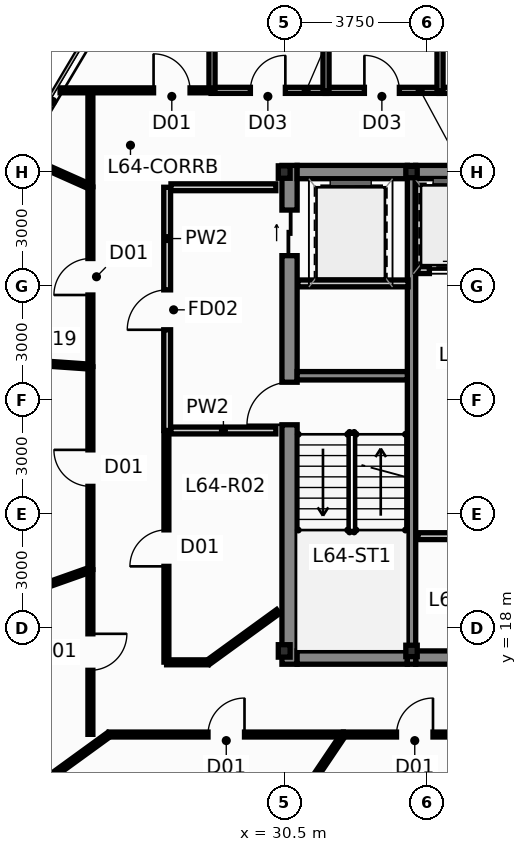
"""IFC4 building model, lengths in metres.
Left out: names, types, materials, properties, quantities, classifications, styles, units other than length and angle.
Written with IfcOpenShell. Run it as: python <this file> out.ifc"""

import sys

from ifc_helpers import new_model, si_unit, direction, frame, frame_2d, origin, origin_2d, place, context, subcontext, project, spatial, rectangle, hollow_rectangle, i_section, extrude, source, transform, mapped, element, fill, save


model = new_model("IFC4")
c1 = context("Model", 3, precision=1e-05, world=origin(), true_north=direction((0.0, 1.0)))
c2 = subcontext(c1, "Body", "Model", "MODEL_VIEW")
j1 = project(units=[si_unit("LENGTHUNIT", "METRE"), si_unit("PLANEANGLEUNIT", "RADIAN")], contexts=[c1])
p1 = place(None, origin())
s1 = spatial("IfcSite", under=j1, at=p1, CompositionType="ELEMENT")
p2 = place(p1, origin())
s2 = spatial("IfcBuilding", under=s1, at=p2, CompositionType="ELEMENT")
p3 = place(p2, frame((0.0, 0.0, 244.45)))
s3 = spatial("IfcBuildingStorey", under=s2, at=p3, CompositionType="ELEMENT", Elevation=244.45)
m1 = source(origin(), c2, "Body", "SweptSolid", [
    extrude(i_section(OverallWidth=0.311, OverallDepth=0.327, WebThickness=0.016, FlangeThickness=0.025, at=origin_2d()), origin(), (0.0, 0.0, 1.0), 3.65),
])
for number, where, z_axis, x_axis in (
    (1, (30.5, 17.4, 0.0), (0.0, 0.0, 1.0), (1.0, 0.0, 0.0)),
    (2, (30.5, 30.0, 0.0), (0.0, 0.0, 1.0), (1.0, 0.0, 0.0)),
):
    element("IfcColumn", number, at=place(p3, frame(where, z_axis=z_axis, x_axis=x_axis)), inside=s3, PredefinedType="COLUMN", context=c2, shape_type="MappedRepresentation", body=[
        mapped(m1, transform((0.0, 0.0, 0.0), scale=1.0)),
    ])
m2 = source(origin(), c2, "Body", "SweptSolid", [
    extrude(hollow_rectangle(XDim=0.3, YDim=0.3, WallThickness=0.012, at=origin_2d()), origin(), (0.0, 0.0, 1.0), 3.65),
])
for number, where, z_axis, x_axis in (
    (3, (33.85, 17.4, 0.0), (0.0, 0.0, 1.0), (1.0, 0.0, 0.0)),
    (4, (33.85, 30.0, 0.0), (0.0, 0.0, 1.0), (1.0, 0.0, 0.0)),
):
    element("IfcColumn", number, at=place(p3, frame(where, z_axis=z_axis, x_axis=x_axis)), inside=s3, PredefinedType="COLUMN", context=c2, shape_type="MappedRepresentation", body=[
        mapped(m2, transform((0.0, 0.0, 0.0), scale=1.0)),
    ])
p4 = place(p3, frame((30.64, 17.05, 0.0), z_axis=(0.0, 0.0, 1.0), x_axis=(0.0, 1.0, 0.0)))
e5 = element("IfcWall", 5, at=p4, inside=s3, PredefinedType="SHEAR", context=c2, shape_type="SweptSolid", body=[
    extrude(rectangle(XDim=13.125, YDim=0.4, at=frame_2d((6.562, 0.0))), origin(), (0.0, 0.0, 1.0), 3.65),
])
p5 = place(p4, frame((6.3, 0.0, 0.0)))
e6 = element("IfcOpeningElement", 6, at=p5, cuts=e5, PredefinedType="OPENING", context=c2, shape_type="SweptSolid", body=[
    extrude(rectangle(XDim=1.12, YDim=2.15, at=frame_2d((0.56, 1.075))), frame((0.0, 0.212, 0.0), z_axis=(0.0, -1.0, 0.0), x_axis=(1.0, 0.0, 0.0)), (0.0, 0.0, 1.0), 0.424),
])
p6 = place(p4, frame((10.75, 0.0, 0.0)))
e7 = element("IfcOpeningElement", 7, at=p6, cuts=e5, PredefinedType="OPENING", context=c2, shape_type="SweptSolid", body=[
    extrude(rectangle(XDim=1.2, YDim=2.2, at=frame_2d((0.6, 1.1))), frame((0.0, 0.212, 0.0), z_axis=(0.0, -1.0, 0.0), x_axis=(1.0, 0.0, 0.0)), (0.0, 0.0, 1.0), 0.424),
])
p7 = place(p3, frame((30.84, 17.225, 0.0), z_axis=(0.0, 0.0, 1.0), x_axis=(1.0, 0.0, 0.0)))
e8 = element("IfcWall", 8, at=p7, inside=s3, PredefinedType="SHEAR", context=c2, shape_type="SweptSolid", body=[
    extrude(rectangle(XDim=2.9, YDim=0.35, at=frame_2d((1.45, 0.0))), origin(), (0.0, 0.0, 1.0), 3.65),
])
p8 = place(p3, frame((33.96, 17.225, 0.0), z_axis=(0.0, 0.0, 1.0), x_axis=(1.0, 0.0, 0.0)))
e9 = element("IfcWall", 9, at=p8, inside=s3, PredefinedType="SHEAR", context=c2, shape_type="SweptSolid", body=[
    extrude(rectangle(XDim=8.08, YDim=0.35, at=frame_2d((4.04, 0.0))), origin(), (0.0, 0.0, 1.0), 3.65),
])
p9 = place(p3, frame((30.84, 30.0, 0.0), z_axis=(0.0, 0.0, 1.0), x_axis=(1.0, 0.0, 0.0)))
e10 = element("IfcWall", 10, at=p9, inside=s3, PredefinedType="SHEAR", context=c2, shape_type="SweptSolid", body=[
    extrude(rectangle(XDim=2.9, YDim=0.35, at=frame_2d((1.45, 0.0))), origin(), (0.0, 0.0, 1.0), 3.65),
])
p10 = place(p3, frame((33.96, 30.0, 0.0), z_axis=(0.0, 0.0, 1.0), x_axis=(1.0, 0.0, 0.0)))
e11 = element("IfcWall", 11, at=p10, inside=s3, PredefinedType="SHEAR", context=c2, shape_type="SweptSolid", body=[
    extrude(rectangle(XDim=3.78, YDim=0.35, at=frame_2d((1.89, 0.0))), origin(), (0.0, 0.0, 1.0), 3.65),
])
p11 = place(p3, frame((33.85, 17.05, 0.0), z_axis=(0.0, 0.0, 1.0), x_axis=(0.0, 1.0, 0.0)))
e12 = element("IfcWall", 12, at=p11, inside=s3, PredefinedType="SHEAR", context=c2, shape_type="SweptSolid", body=[
    extrude(rectangle(XDim=13.125, YDim=0.22, at=frame_2d((6.562, 0.0))), origin(), (0.0, 0.0, 1.0), 3.65),
])
p12 = place(p3, frame((30.84, 24.64, 0.0), z_axis=(0.0, 0.0, 1.0), x_axis=(1.0, 0.0, 0.0)))
e13 = element("IfcWall", 13, at=p12, inside=s3, PredefinedType="SHEAR", context=c2, shape_type="SweptSolid", body=[
    extrude(rectangle(XDim=2.9, YDim=0.22, at=frame_2d((1.45, 0.0))), origin(), (0.0, 0.0, 1.0), 3.65),
])
p13 = place(p3, frame((34.02, 27.42, 0.0), z_axis=(0.0, 0.0, 1.0), x_axis=(1.0, 0.0, 0.0)))
e14 = element("IfcWall", 14, at=p13, inside=s3, PredefinedType="PARTITIONING", context=c2, shape_type="SweptSolid", body=[
    extrude(rectangle(XDim=3.66, YDim=0.18, at=frame_2d((1.83, 0.0))), origin(), (0.0, 0.0, 1.0), 3.4),
])
p14 = place(p13, frame((0.3, 0.0, 0.0)))
e15 = element("IfcOpeningElement", 15, at=p14, cuts=e14, PredefinedType="OPENING", context=c2, shape_type="SweptSolid", body=[
    extrude(rectangle(XDim=1.15, YDim=2.2, at=frame_2d((0.575, 1.1))), frame((0.0, 0.102, 0.0), z_axis=(0.0, -1.0, 0.0), x_axis=(1.0, 0.0, 0.0)), (0.0, 0.0, 1.0), 0.204),
])
p15 = place(p13, frame((2.1, 0.0, 0.0)))
e16 = element("IfcOpeningElement", 16, at=p15, cuts=e14, PredefinedType="OPENING", context=c2, shape_type="SweptSolid", body=[
    extrude(rectangle(XDim=1.15, YDim=2.2, at=frame_2d((0.575, 1.1))), frame((0.0, 0.102, 0.0), z_axis=(0.0, -1.0, 0.0), x_axis=(1.0, 0.0, 0.0)), (0.0, 0.0, 1.0), 0.204),
])
p16 = place(p3, frame((27.42, 23.2, 0.0), z_axis=(0.0, 0.0, 1.0), x_axis=(0.0, 1.0, 0.0)))
e17 = element("IfcWall", 17, at=p16, inside=s3, PredefinedType="PARTITIONING", context=c2, shape_type="SweptSolid", body=[
    extrude(rectangle(XDim=6.4, YDim=0.18, at=frame_2d((3.2, 0.0))), origin(), (0.0, 0.0, 1.0), 3.129),
])
p17 = place(p16, frame((2.65, 0.0, 0.0)))
e18 = element("IfcOpeningElement", 18, at=p17, cuts=e17, PredefinedType="OPENING", context=c2, shape_type="SweptSolid", body=[
    extrude(rectangle(XDim=1.05, YDim=2.15, at=frame_2d((0.525, 1.075))), frame((0.0, 0.102, 0.0), z_axis=(0.0, -1.0, 0.0), x_axis=(1.0, 0.0, 0.0)), (0.0, 0.0, 1.0), 0.204),
])
for number, where, z_axis, x_axis in (
    (19, (27.52, 23.2, 0.0), (0.0, 0.0, 1.0), (1.0, 0.0, 0.0)),
    (20, (27.52, 29.6, 0.0), (0.0, 0.0, 1.0), (1.0, 0.0, 0.0)),
):
    element("IfcWall", number, at=place(p3, frame(where, z_axis=z_axis, x_axis=x_axis)), inside=s3, PredefinedType="PARTITIONING", context=c2, shape_type="SweptSolid", body=[
        extrude(rectangle(XDim=2.76, YDim=0.18, at=frame_2d((1.38, 0.0))), origin(), (0.0, 0.0, 1.0), 3.4),
    ])
p18 = place(p3, frame((30.86, 27.07, 0.0), z_axis=(0.0, 0.0, 1.0), x_axis=(1.0, 0.0, 0.0)))
e21 = element("IfcWall", 21, at=p18, inside=s3, PredefinedType="PARTITIONING", context=c2, shape_type="SweptSolid", body=[
    extrude(rectangle(XDim=2.9, YDim=0.18, at=frame_2d((1.45, 0.0))), origin(), (0.0, 0.0, 1.0), 3.4),
])
p19 = place(p3, frame((34.02, 20.42, 0.0), z_axis=(0.0, 0.0, 1.0), x_axis=(1.0, 0.0, 0.0)))
e22 = element("IfcWall", 22, at=p19, inside=s3, PredefinedType="PARTITIONING", context=c2, shape_type="SweptSolid", body=[
    extrude(rectangle(XDim=3.64, YDim=0.18, at=frame_2d((1.82, 0.0))), origin(), (0.0, 0.0, 1.0), 3.4),
])
p20 = place(p3, frame((28.575, 32.15, 0.0), z_axis=(0.0, 0.0, 1.0), x_axis=(1.0, 0.0, 0.0)))
e23 = element("IfcWall", 23, at=p20, inside=s3, PredefinedType="PLUMBINGWALL", context=c2, shape_type="SweptSolid", body=[
    extrude(rectangle(XDim=3.05, YDim=0.16, at=frame_2d((1.525, 0.0))), origin(), (0.0, 0.0, 1.0), 3.4),
])
p21 = place(p20, frame((1.035, 0.0, 0.0)))
e24 = element("IfcOpeningElement", 24, at=p21, cuts=e23, PredefinedType="OPENING", context=c2, shape_type="SweptSolid", body=[
    extrude(rectangle(XDim=0.92, YDim=2.1, at=frame_2d((0.46, 1.05))), frame((0.0, 0.092, 0.0), z_axis=(0.0, -1.0, 0.0), x_axis=(1.0, 0.0, 0.0)), (0.0, 0.0, 1.0), 0.184),
])
p22 = place(p3, frame((31.575, 32.15, 0.0), z_axis=(0.0, 0.0, 1.0), x_axis=(1.0, 0.0, 0.0)))
e25 = element("IfcWall", 25, at=p22, inside=s3, PredefinedType="PLUMBINGWALL", context=c2, shape_type="SweptSolid", body=[
    extrude(rectangle(XDim=3.05, YDim=0.16, at=frame_2d((1.525, 0.0))), origin(), (0.0, 0.0, 1.0), 3.4),
])
p23 = place(p22, frame((1.035, 0.0, 0.0)))
e26 = element("IfcOpeningElement", 26, at=p23, cuts=e25, PredefinedType="OPENING", context=c2, shape_type="SweptSolid", body=[
    extrude(rectangle(XDim=0.92, YDim=2.1, at=frame_2d((0.46, 1.05))), frame((0.0, 0.092, 0.0), z_axis=(0.0, -1.0, 0.0), x_axis=(1.0, 0.0, 0.0)), (0.0, 0.0, 1.0), 0.184),
])
p24 = place(p3, frame((34.575, 32.15, 0.0), z_axis=(0.0, 0.0, 1.0), x_axis=(1.0, 0.0, 0.0)))
e27 = element("IfcWall", 27, at=p24, inside=s3, PredefinedType="PLUMBINGWALL", context=c2, shape_type="SweptSolid", body=[
    extrude(rectangle(XDim=3.05, YDim=0.16, at=frame_2d((1.525, 0.0))), origin(), (0.0, 0.0, 1.0), 3.4),
])
p25 = place(p24, frame((1.035, 0.0, 0.0)))
e28 = element("IfcOpeningElement", 28, at=p25, cuts=e27, PredefinedType="OPENING", context=c2, shape_type="SweptSolid", body=[
    extrude(rectangle(XDim=0.92, YDim=2.1, at=frame_2d((0.46, 1.05))), frame((0.0, 0.092, 0.0), z_axis=(0.0, -1.0, 0.0), x_axis=(1.0, 0.0, 0.0)), (0.0, 0.0, 1.0), 0.184),
])
for number, where, z_axis, x_axis in (
    (29, (31.6, 32.125, 0.0), (0.0, 0.0, 1.0), (0.0, 1.0, 0.0)),
    (30, (28.6, 32.125, 0.0), (0.0, 0.0, 1.0), (0.0, 1.0, 0.0)),
):
    element("IfcWall", number, at=place(p3, frame(where, z_axis=z_axis, x_axis=x_axis)), inside=s3, PredefinedType="PLUMBINGWALL", context=c2, shape_type="SweptSolid", body=[
        extrude(rectangle(XDim=2.85, YDim=0.16, at=frame_2d((1.425, 0.0))), origin(), (0.0, 0.0, 1.0), 2.985),
    ])
p26 = place(p3, frame((34.6, 32.125, 0.0), z_axis=(0.0, 0.0, 1.0), x_axis=(0.0, 1.0, 0.0)))
e31 = element("IfcWall", 31, at=p26, inside=s3, PredefinedType="PLUMBINGWALL", context=c2, shape_type="SweptSolid", body=[
    extrude(rectangle(XDim=2.85, YDim=0.16, at=frame_2d((1.425, 0.0))), origin(), (0.0, 0.0, 1.0), 3.4),
])
p27 = place(p3, frame((15.82, 7.884, 0.0), z_axis=(0.0, 0.0, 1.0), x_axis=(0.809043133631, 0.587749273011, 0.0)))
e32 = element("IfcWall", 32, at=p27, inside=s3, PredefinedType="PARTITIONING", context=c2, shape_type="SweptSolid", body=[
    extrude(rectangle(XDim=12.442, YDim=0.13, at=frame_2d((6.221, 0.0))), origin(), (0.0, 0.0, 1.0), 3.4),
])
p28 = place(p3, frame((14.863, 15.811, 0.0), z_axis=(0.0, 0.0, 1.0), x_axis=(0.942701126823, 0.333638405293, 0.0)))
e33 = element("IfcWall", 33, at=p28, inside=s3, PredefinedType="PARTITIONING", context=c2, shape_type="SweptSolid", body=[
    extrude(rectangle(XDim=11.172, YDim=0.13, at=frame_2d((5.586, 0.0))), origin(), (0.0, 0.0, 1.0), 2.985),
])
p29 = place(p3, frame((27.062, 7.783, 0.0), z_axis=(0.0, 0.0, 1.0), x_axis=(0.558733820508, 0.829347043053, 0.0)))
e34 = element("IfcWall", 34, at=p29, inside=s3, PredefinedType="PARTITIONING", context=c2, shape_type="SweptSolid", body=[
    extrude(rectangle(XDim=8.939, YDim=0.13, at=frame_2d((4.469, 0.0))), origin(), (0.0, 0.0, 1.0), 3.4),
])
p30 = place(p3, frame((33.943, 7.721, 0.0), z_axis=(0.0, 0.0, 1.0), x_axis=(0.242274634851, 0.970207710394, 0.0)))
e35 = element("IfcWall", 35, at=p30, inside=s3, PredefinedType="PARTITIONING", context=c2, shape_type="SweptSolid", body=[
    extrude(rectangle(XDim=7.704, YDim=0.13, at=frame_2d((3.852, 0.0))), origin(), (0.0, 0.0, 1.0), 3.4),
])
p31 = place(p3, frame((25.895, 15.2, 0.0), z_axis=(0.0, 0.0, 1.0), x_axis=(1.0, 0.0, 0.0)))
e36 = element("IfcWall", 36, at=p31, inside=s3, PredefinedType="PARTITIONING", context=c2, shape_type="SweptSolid", body=[
    extrude(rectangle(XDim=6.16, YDim=0.13, at=frame_2d((3.08, 0.0))), origin(), (0.0, 0.0, 1.0), 3.129),
])
p32 = place(p31, frame((2.6, 0.0, 0.0)))
e37 = element("IfcOpeningElement", 37, at=p32, cuts=e36, PredefinedType="OPENING", context=c2, shape_type="SweptSolid", body=[
    extrude(rectangle(XDim=0.96, YDim=2.15, at=frame_2d((0.48, 1.075))), frame((0.0, 0.077, 0.0), z_axis=(0.0, -1.0, 0.0), x_axis=(1.0, 0.0, 0.0)), (0.0, 0.0, 1.0), 0.154),
])
p33 = place(p3, frame((27.4, 17.105, 0.0), z_axis=(0.0, 0.0, 1.0), x_axis=(0.0, 1.0, 0.0)))
e38 = element("IfcWall", 38, at=p33, inside=s3, PredefinedType="PARTITIONING", context=c2, shape_type="SweptSolid", body=[
    extrude(rectangle(XDim=6.0, YDim=0.13, at=frame_2d((3.0, 0.0))), origin(), (0.0, 0.0, 1.0), 3.4),
])
p34 = place(p33, frame((2.52, 0.0, 0.0)))
e39 = element("IfcOpeningElement", 39, at=p34, cuts=e38, PredefinedType="OPENING", context=c2, shape_type="SweptSolid", body=[
    extrude(rectangle(XDim=0.96, YDim=2.15, at=frame_2d((0.48, 1.075))), frame((0.0, 0.077, 0.0), z_axis=(0.0, -1.0, 0.0), x_axis=(1.0, 0.0, 0.0)), (0.0, 0.0, 1.0), 0.154),
])
p35 = place(p3, frame((25.4, 19.545, 0.0), z_axis=(0.0, 0.0, 1.0), x_axis=(0.0, 1.0, 0.0)))
e40 = element("IfcWall", 40, at=p35, inside=s3, PredefinedType="PARTITIONING", context=c2, shape_type="SweptSolid", body=[
    extrude(rectangle(XDim=5.33, YDim=0.13, at=frame_2d((2.665, 0.0))), origin(), (0.0, 0.0, 1.0), 3.129),
])
p36 = place(p35, frame((2.185, 0.0, 0.0)))
e41 = element("IfcOpeningElement", 41, at=p36, cuts=e40, PredefinedType="OPENING", context=c2, shape_type="SweptSolid", body=[
    extrude(rectangle(XDim=0.96, YDim=2.15, at=frame_2d((0.48, 1.075))), frame((0.0, 0.077, 0.0), z_axis=(0.0, -1.0, 0.0), x_axis=(1.0, 0.0, 0.0)), (0.0, 0.0, 1.0), 0.154),
])
p37 = place(p3, frame((20.458, 25.222, 0.0), z_axis=(0.0, 0.0, 1.0), x_axis=(0.997601870104, -0.069213501323, 0.0)))
e42 = element("IfcWall", 42, at=p37, inside=s3, PredefinedType="PARTITIONING", context=c2, shape_type="SweptSolid", body=[
    extrude(rectangle(XDim=4.949, YDim=0.13, at=frame_2d((2.475, 0.0))), origin(), (0.0, 0.0, 1.0), 3.4),
])
p38 = place(p3, frame((25.4, 24.885, 0.0), z_axis=(0.0, 0.0, 1.0), x_axis=(0.0, 1.0, 0.0)))
e43 = element("IfcWall", 43, at=p38, inside=s3, PredefinedType="PARTITIONING", context=c2, shape_type="SweptSolid", body=[
    extrude(rectangle(XDim=4.72, YDim=0.13, at=frame_2d((2.36, 0.0))), origin(), (0.0, 0.0, 1.0), 3.129),
])
p39 = place(p38, frame((1.88, 0.0, 0.0)))
e44 = element("IfcOpeningElement", 44, at=p39, cuts=e43, PredefinedType="OPENING", context=c2, shape_type="SweptSolid", body=[
    extrude(rectangle(XDim=0.96, YDim=2.15, at=frame_2d((0.48, 1.075))), frame((0.0, 0.077, 0.0), z_axis=(0.0, -1.0, 0.0), x_axis=(1.0, 0.0, 0.0)), (0.0, 0.0, 1.0), 0.154),
])
p40 = place(p3, frame((25.4, 19.535, 0.0), z_axis=(0.0, 0.0, 1.0), x_axis=(0.0, -1.0, 0.0)))
e45 = element("IfcWall", 45, at=p40, inside=s3, PredefinedType="PARTITIONING", context=c2, shape_type="SweptSolid", body=[
    extrude(rectangle(XDim=4.33, YDim=0.13, at=frame_2d((2.165, 0.0))), origin(), (0.0, 0.0, 1.0), 3.129),
])
p41 = place(p40, frame((1.685, 0.0, 0.0)))
e46 = element("IfcOpeningElement", 46, at=p41, cuts=e45, PredefinedType="OPENING", context=c2, shape_type="SweptSolid", body=[
    extrude(rectangle(XDim=0.96, YDim=2.15, at=frame_2d((0.48, 1.075))), frame((0.0, 0.077, 0.0), z_axis=(0.0, -1.0, 0.0), x_axis=(1.0, 0.0, 0.0)), (0.0, 0.0, 1.0), 0.154),
])
p42 = place(p3, frame((32.065, 15.2, 0.0), z_axis=(0.0, 0.0, 1.0), x_axis=(1.0, 0.0, 0.0)))
e47 = element("IfcWall", 47, at=p42, inside=s3, PredefinedType="PARTITIONING", context=c2, shape_type="SweptSolid", body=[
    extrude(rectangle(XDim=3.74, YDim=0.13, at=frame_2d((1.87, 0.0))), origin(), (0.0, 0.0, 1.0), 3.129),
])
p43 = place(p42, frame((1.39, 0.0, 0.0)))
e48 = element("IfcOpeningElement", 48, at=p43, cuts=e47, PredefinedType="OPENING", context=c2, shape_type="SweptSolid", body=[
    extrude(rectangle(XDim=0.96, YDim=2.15, at=frame_2d((0.48, 1.075))), frame((0.0, 0.077, 0.0), z_axis=(0.0, -1.0, 0.0), x_axis=(1.0, 0.0, 0.0)), (0.0, 0.0, 1.0), 0.154),
])
p44 = place(p3, frame((24.602, 32.15, 0.0), z_axis=(0.0, 0.0, 1.0), x_axis=(1.0, 0.0, 0.0)))
e49 = element("IfcWall", 49, at=p44, inside=s3, PredefinedType="PARTITIONING", context=c2, shape_type="SweptSolid", body=[
    extrude(rectangle(XDim=3.993, YDim=0.13, at=frame_2d((1.997, 0.0))), origin(), (0.0, 0.0, 1.0), 3.4),
])
p45 = place(p44, frame((2.46, 0.0, 0.0)))
e50 = element("IfcOpeningElement", 50, at=p45, cuts=e49, PredefinedType="OPENING", context=c2, shape_type="SweptSolid", body=[
    extrude(rectangle(XDim=0.96, YDim=2.15, at=frame_2d((0.48, 1.075))), frame((0.0, 0.077, 0.0), z_axis=(0.0, -1.0, 0.0), x_axis=(1.0, 0.0, 0.0)), (0.0, 0.0, 1.0), 0.154),
])
p46 = place(p3, frame((25.4, 29.615, 0.0), z_axis=(0.0, 0.0, 1.0), x_axis=(0.0, 1.0, 0.0)))
e51 = element("IfcWall", 51, at=p46, inside=s3, PredefinedType="PARTITIONING", context=c2, shape_type="SweptSolid", body=[
    extrude(rectangle(XDim=2.53, YDim=0.13, at=frame_2d((1.265, 0.0))), origin(), (0.0, 0.0, 1.0), 3.4),
])
p47 = place(p3, frame((30.339, 18.436, 0.0), z_axis=(0.0, 0.0, 1.0), x_axis=(-0.809089677868, -0.587685199037, 0.0)))
e52 = element("IfcWall", 52, at=p47, inside=s3, PredefinedType="PARTITIONING", context=c2, shape_type="SweptSolid", body=[
    extrude(rectangle(XDim=2.268, YDim=0.13, at=frame_2d((1.134, 0.0))), origin(), (0.0, 0.0, 1.0), 3.4),
])
p48 = place(p3, frame((23.555, 30.432, 0.0), z_axis=(0.0, 0.0, 1.0), x_axis=(0.913396283193, -0.407071529156, 0.0)))
e53 = element("IfcWall", 53, at=p48, inside=s3, PredefinedType="PARTITIONING", context=c2, shape_type="SweptSolid", body=[
    extrude(rectangle(XDim=2.015, YDim=0.13, at=frame_2d((1.007, 0.0))), origin(), (0.0, 0.0, 1.0), 3.4),
])
p49 = place(p3, frame((28.495, 17.1, 0.0), z_axis=(0.0, 0.0, 1.0), x_axis=(-1.0, 0.0, 0.0)))
e54 = element("IfcWall", 54, at=p49, inside=s3, PredefinedType="PARTITIONING", context=c2, shape_type="SweptSolid", body=[
    extrude(rectangle(XDim=1.09, YDim=0.13, at=frame_2d((0.545, 0.0))), origin(), (0.0, 0.0, 1.0), 2.985),
])
p50 = place(p5, origin())
e55 = element("IfcDoor", 55, at=p50, inside=s3, OperationType="SINGLE_SWING_LEFT", PredefinedType="DOOR", context=c2, shape_type="SweptSolid", body=[
    extrude(rectangle(XDim=1.12, YDim=2.15, at=frame_2d((0.56, 1.075))), frame((0.0, 0.025, 0.0), z_axis=(0.0, -1.0, 0.0), x_axis=(1.0, 0.0, 0.0)), (0.0, 0.0, 1.0), 0.05),
])
fill(e6, e55)
p51 = place(p6, origin())
e56 = element("IfcDoor", 56, at=p51, inside=s3, OperationType="SLIDING_TO_LEFT", PredefinedType="DOOR", context=c2, shape_type="SweptSolid", body=[
    extrude(rectangle(XDim=1.2, YDim=2.2, at=frame_2d((0.6, 1.1))), frame((0.0, 0.025, 0.0), z_axis=(0.0, -1.0, 0.0), x_axis=(1.0, 0.0, 0.0)), (0.0, 0.0, 1.0), 0.05),
])
fill(e7, e56)
p52 = place(p14, origin())
e57 = element("IfcDoor", 57, at=p52, inside=s3, OperationType="SLIDING_TO_RIGHT", PredefinedType="DOOR", context=c2, shape_type="SweptSolid", body=[
    extrude(rectangle(XDim=1.15, YDim=2.2, at=frame_2d((0.575, 1.1))), frame((0.0, 0.025, 0.0), z_axis=(0.0, -1.0, 0.0), x_axis=(1.0, 0.0, 0.0)), (0.0, 0.0, 1.0), 0.05),
])
fill(e15, e57)
p53 = place(p17, origin())
e58 = element("IfcDoor", 58, at=p53, inside=s3, OperationType="SINGLE_SWING_LEFT", PredefinedType="DOOR", context=c2, shape_type="SweptSolid", body=[
    extrude(rectangle(XDim=1.05, YDim=2.15, at=frame_2d((0.525, 1.075))), frame((0.0, 0.025, 0.0), z_axis=(0.0, -1.0, 0.0), x_axis=(1.0, 0.0, 0.0)), (0.0, 0.0, 1.0), 0.05),
])
fill(e18, e58)
p54 = place(p21, origin())
e59 = element("IfcDoor", 59, at=p54, inside=s3, OperationType="SINGLE_SWING_RIGHT", PredefinedType="DOOR", context=c2, shape_type="SweptSolid", body=[
    extrude(rectangle(XDim=0.92, YDim=2.1, at=frame_2d((0.46, 1.05))), frame((0.0, 0.025, 0.0), z_axis=(0.0, -1.0, 0.0), x_axis=(1.0, 0.0, 0.0)), (0.0, 0.0, 1.0), 0.05),
])
fill(e24, e59)
p55 = place(p23, origin())
e60 = element("IfcDoor", 60, at=p55, inside=s3, OperationType="SINGLE_SWING_LEFT", PredefinedType="DOOR", context=c2, shape_type="SweptSolid", body=[
    extrude(rectangle(XDim=0.92, YDim=2.1, at=frame_2d((0.46, 1.05))), frame((0.0, 0.025, 0.0), z_axis=(0.0, -1.0, 0.0), x_axis=(1.0, 0.0, 0.0)), (0.0, 0.0, 1.0), 0.05),
])
fill(e26, e60)
p56 = place(p32, origin())
e61 = element("IfcDoor", 61, at=p56, inside=s3, OperationType="SINGLE_SWING_RIGHT", PredefinedType="DOOR", context=c2, shape_type="SweptSolid", body=[
    extrude(rectangle(XDim=0.96, YDim=2.15, at=frame_2d((0.48, 1.075))), frame((0.0, 0.025, 0.0), z_axis=(0.0, -1.0, 0.0), x_axis=(1.0, 0.0, 0.0)), (0.0, 0.0, 1.0), 0.05),
])
fill(e37, e61)
p57 = place(p34, origin())
e62 = element("IfcDoor", 62, at=p57, inside=s3, OperationType="SINGLE_SWING_LEFT", PredefinedType="DOOR", context=c2, shape_type="SweptSolid", body=[
    extrude(rectangle(XDim=0.96, YDim=2.15, at=frame_2d((0.48, 1.075))), frame((0.0, 0.025, 0.0), z_axis=(0.0, -1.0, 0.0), x_axis=(1.0, 0.0, 0.0)), (0.0, 0.0, 1.0), 0.05),
])
fill(e39, e62)
p58 = place(p36, origin())
e63 = element("IfcDoor", 63, at=p58, inside=s3, OperationType="SINGLE_SWING_RIGHT", PredefinedType="DOOR", context=c2, shape_type="SweptSolid", body=[
    extrude(rectangle(XDim=0.96, YDim=2.15, at=frame_2d((0.48, 1.075))), frame((0.0, 0.025, 0.0), z_axis=(0.0, -1.0, 0.0), x_axis=(1.0, 0.0, 0.0)), (0.0, 0.0, 1.0), 0.05),
])
fill(e41, e63)
p59 = place(p39, origin())
e64 = element("IfcDoor", 64, at=p59, inside=s3, OperationType="SINGLE_SWING_LEFT", PredefinedType="DOOR", context=c2, shape_type="SweptSolid", body=[
    extrude(rectangle(XDim=0.96, YDim=2.15, at=frame_2d((0.48, 1.075))), frame((0.0, 0.025, 0.0), z_axis=(0.0, -1.0, 0.0), x_axis=(1.0, 0.0, 0.0)), (0.0, 0.0, 1.0), 0.05),
])
fill(e44, e64)
p60 = place(p41, origin())
e65 = element("IfcDoor", 65, at=p60, inside=s3, OperationType="SINGLE_SWING_LEFT", PredefinedType="DOOR", context=c2, shape_type="SweptSolid", body=[
    extrude(rectangle(XDim=0.96, YDim=2.15, at=frame_2d((0.48, 1.075))), frame((0.0, 0.025, 0.0), z_axis=(0.0, -1.0, 0.0), x_axis=(1.0, 0.0, 0.0)), (0.0, 0.0, 1.0), 0.05),
])
fill(e46, e65)
p61 = place(p43, origin())
e66 = element("IfcDoor", 66, at=p61, inside=s3, OperationType="SINGLE_SWING_RIGHT", PredefinedType="DOOR", context=c2, shape_type="SweptSolid", body=[
    extrude(rectangle(XDim=0.96, YDim=2.15, at=frame_2d((0.48, 1.075))), frame((0.0, 0.025, 0.0), z_axis=(0.0, -1.0, 0.0), x_axis=(1.0, 0.0, 0.0)), (0.0, 0.0, 1.0), 0.05),
])
fill(e48, e66)
p62 = place(p45, origin())
e67 = element("IfcDoor", 67, at=p62, inside=s3, OperationType="SINGLE_SWING_LEFT", PredefinedType="DOOR", context=c2, shape_type="SweptSolid", body=[
    extrude(rectangle(XDim=0.96, YDim=2.15, at=frame_2d((0.48, 1.075))), frame((0.0, 0.025, 0.0), z_axis=(0.0, -1.0, 0.0), x_axis=(1.0, 0.0, 0.0)), (0.0, 0.0, 1.0), 0.05),
])
fill(e50, e67)
save(model, sys.argv[1])
